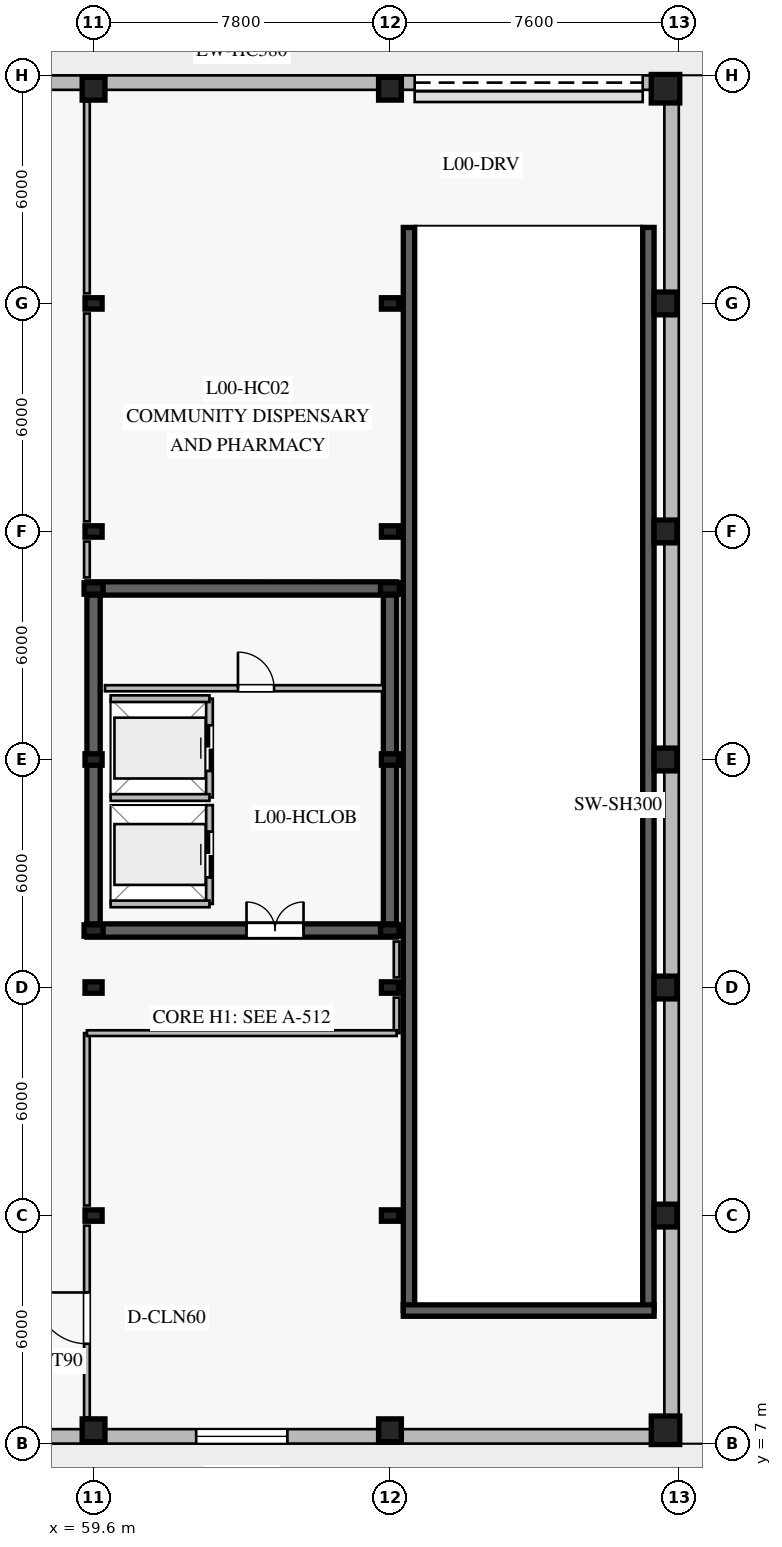
"""IFC4 building model, lengths in metres.
Left out: names, types, materials, properties, quantities, classifications, styles, units other than length and angle.
Written with IfcOpenShell. Run it as: python <this file> out.ifc"""

import sys

from ifc_helpers import new_model, si_unit, direction, frame, frame_2d, origin, origin_2d, place, context, subcontext, project, spatial, rectangle, i_section, extrude, element, fill, save


model = new_model("IFC4")
c1 = context("Model", 3, precision=1e-05, world=origin(), true_north=direction((0.0, 1.0)))
c2 = subcontext(c1, "Body", "Model", "MODEL_VIEW")
j1 = project(units=[si_unit("LENGTHUNIT", "METRE"), si_unit("PLANEANGLEUNIT", "RADIAN")], contexts=[c1])
p1 = place(None, origin())
s1 = spatial("IfcSite", under=j1, at=p1, CompositionType="ELEMENT")
p2 = place(p1, origin())
s2 = spatial("IfcBuilding", under=s1, at=p2, CompositionType="ELEMENT")
p3 = place(p2, origin())
s3 = spatial("IfcBuildingStorey", under=s2, at=p3, CompositionType="ELEMENT", Elevation=0.0)
for number, where, z_axis, x_axis in (
    (1, (67.9, 10.5, 0.0), (0.0, 0.0, 1.0), (0.0, 1.0, 0.0)),
    (2, (74.2, 10.5, 0.0), (0.0, 0.0, 1.0), (0.0, 1.0, 0.0)),
):
    element("IfcWall", number, at=place(p3, frame(where, z_axis=z_axis, x_axis=x_axis)), inside=s3, PredefinedType="SOLIDWALL", context=c2, shape_type="SweptSolid", body=[
        extrude(rectangle(XDim=28.5, YDim=0.3, at=frame_2d((14.25, 0.0))), origin(), (0.0, 0.0, 1.0), 4.94),
    ])
p4 = place(p3, frame((67.75, 10.5, 0.0), z_axis=(0.0, 0.0, 1.0), x_axis=(1.0, 0.0, 0.0)))
e3 = element("IfcWall", 3, at=p4, inside=s3, PredefinedType="SOLIDWALL", context=c2, shape_type="SweptSolid", body=[
    extrude(rectangle(XDim=6.6, YDim=0.3, at=frame_2d((3.3, 0.0))), origin(), (0.0, 0.0, 1.0), 4.94),
])
p5 = place(p3, frame((59.425, 20.5, 0.0), z_axis=(0.0, 0.0, 1.0), x_axis=(1.0, 0.0, 0.0)))
e4 = element("IfcWall", 4, at=p5, inside=s3, PredefinedType="SHEAR", context=c2, shape_type="SweptSolid", body=[
    extrude(rectangle(XDim=8.15, YDim=0.35, at=frame_2d((4.075, 0.0))), origin(), (0.0, 0.0, 1.0), 4.94),
])
p6 = place(p5, frame((4.2, 0.0, 0.0)))
e5 = element("IfcOpeningElement", 5, at=p6, cuts=e4, PredefinedType="OPENING", context=c2, shape_type="SweptSolid", body=[
    extrude(rectangle(XDim=1.5, YDim=2.2, at=frame_2d((0.75, 1.1))), frame((0.0, 0.185, 0.0), z_axis=(0.0, -1.0, 0.0), x_axis=(1.0, 0.0, 0.0)), (0.0, 0.0, 1.0), 0.37),
])
p7 = place(p3, frame((67.575, 29.5, 0.0), z_axis=(0.0, 0.0, 1.0), x_axis=(-1.0, 0.0, 0.0)))
e6 = element("IfcWall", 6, at=p7, inside=s3, PredefinedType="SHEAR", context=c2, shape_type="SweptSolid", body=[
    extrude(rectangle(XDim=8.15, YDim=0.35, at=frame_2d((4.075, 0.0))), origin(), (0.0, 0.0, 1.0), 4.94),
])
for number, where, z_axis, x_axis in (
    (7, (59.6, 29.325, 0.0), (0.0, 0.0, 1.0), (0.0, -1.0, 0.0)),
    (8, (67.4, 20.675, 0.0), (0.0, 0.0, 1.0), (0.0, 1.0, 0.0)),
):
    element("IfcWall", number, at=place(p3, frame(where, z_axis=z_axis, x_axis=x_axis)), inside=s3, PredefinedType="SHEAR", context=c2, shape_type="SweptSolid", body=[
        extrude(rectangle(XDim=8.65, YDim=0.35, at=frame_2d((4.325, 0.0))), origin(), (0.0, 0.0, 1.0), 4.94),
    ])
for number, where, z_axis, x_axis in (
    (9, (59.6, 20.5, 0.0), (0.0, 0.0, 1.0), (1.0, 0.0, 0.0)),
    (10, (67.4, 20.5, 0.0), (0.0, 0.0, 1.0), (1.0, 0.0, 0.0)),
    (11, (67.4, 29.5, 0.0), (0.0, 0.0, 1.0), (1.0, 0.0, 0.0)),
    (12, (59.6, 29.5, 0.0), (0.0, 0.0, 1.0), (1.0, 0.0, 0.0)),
):
    element("IfcColumn", number, at=place(p3, frame(where, z_axis=z_axis, x_axis=x_axis)), inside=s3, PredefinedType="COLUMN", context=c2, shape_type="SweptSolid", body=[
        extrude(i_section(OverallWidth=0.3, OverallDepth=0.5, WebThickness=0.014, FlangeThickness=0.028, at=origin_2d()), origin(), (0.0, 0.0, 1.0), 5.2),
    ])
p8 = place(p3, frame((59.6, 7.35, 0.0), z_axis=(0.0, 0.0, 1.0), x_axis=(1.0, 0.0, 0.0)))
e13 = element("IfcColumn", 13, at=p8, inside=s3, PredefinedType="COLUMN", context=c2, shape_type="SweptSolid", body=[
    extrude(rectangle(XDim=0.6, YDim=0.6, at=origin_2d()), origin(), (0.0, 0.0, 1.0), 5.2),
])
for number, where, z_axis, x_axis in (
    (14, (59.6, 13.0, 0.0), (0.0, 0.0, 1.0), (1.0, 0.0, 0.0)),
    (15, (59.6, 19.0, 0.0), (0.0, 0.0, 1.0), (1.0, 0.0, 0.0)),
    (16, (59.6, 25.0, 0.0), (0.0, 0.0, 1.0), (1.0, 0.0, 0.0)),
    (17, (59.6, 31.0, 0.0), (0.0, 0.0, 1.0), (1.0, 0.0, 0.0)),
    (18, (59.6, 37.0, 0.0), (0.0, 0.0, 1.0), (1.0, 0.0, 0.0)),
):
    element("IfcColumn", number, at=place(p3, frame(where, z_axis=z_axis, x_axis=x_axis)), inside=s3, PredefinedType="COLUMN", context=c2, shape_type="SweptSolid", body=[
        extrude(i_section(OverallWidth=0.3, OverallDepth=0.45, WebThickness=0.014, FlangeThickness=0.026, at=origin_2d()), origin(), (0.0, 0.0, 1.0), 5.2),
    ])
for number, where, z_axis, x_axis in (
    (19, (59.6, 42.65, 0.0), (0.0, 0.0, 1.0), (1.0, 0.0, 0.0)),
    (20, (67.4, 7.35, 0.0), (0.0, 0.0, 1.0), (1.0, 0.0, 0.0)),
):
    element("IfcColumn", number, at=place(p3, frame(where, z_axis=z_axis, x_axis=x_axis)), inside=s3, PredefinedType="COLUMN", context=c2, shape_type="SweptSolid", body=[
        extrude(rectangle(XDim=0.6, YDim=0.6, at=origin_2d()), origin(), (0.0, 0.0, 1.0), 5.2),
    ])
for number, where, z_axis, x_axis in (
    (21, (67.4, 13.0, 0.0), (0.0, 0.0, 1.0), (1.0, 0.0, 0.0)),
    (22, (67.4, 19.0, 0.0), (0.0, 0.0, 1.0), (1.0, 0.0, 0.0)),
    (23, (67.4, 25.0, 0.0), (0.0, 0.0, 1.0), (1.0, 0.0, 0.0)),
    (24, (67.4, 31.0, 0.0), (0.0, 0.0, 1.0), (1.0, 0.0, 0.0)),
    (25, (67.4, 37.0, 0.0), (0.0, 0.0, 1.0), (1.0, 0.0, 0.0)),
):
    element("IfcColumn", number, at=place(p3, frame(where, z_axis=z_axis, x_axis=x_axis)), inside=s3, PredefinedType="COLUMN", context=c2, shape_type="SweptSolid", body=[
        extrude(i_section(OverallWidth=0.3, OverallDepth=0.45, WebThickness=0.014, FlangeThickness=0.026, at=origin_2d()), origin(), (0.0, 0.0, 1.0), 5.2),
    ])
p9 = place(p3, frame((67.4, 42.65, 0.0), z_axis=(0.0, 0.0, 1.0), x_axis=(1.0, 0.0, 0.0)))
e26 = element("IfcColumn", 26, at=p9, inside=s3, PredefinedType="COLUMN", context=c2, shape_type="SweptSolid", body=[
    extrude(rectangle(XDim=0.6, YDim=0.6, at=origin_2d()), origin(), (0.0, 0.0, 1.0), 5.2),
])
p10 = place(p3, frame((74.65, 7.35, 0.0), z_axis=(0.0, 0.0, 1.0), x_axis=(1.0, 0.0, 0.0)))
e27 = element("IfcColumn", 27, at=p10, inside=s3, PredefinedType="COLUMN", context=c2, shape_type="SweptSolid", body=[
    extrude(rectangle(XDim=0.75, YDim=0.75, at=origin_2d()), origin(), (0.0, 0.0, 1.0), 5.2),
])
for number, where, z_axis, x_axis in (
    (28, (74.65, 13.0, 0.0), (0.0, 0.0, 1.0), (1.0, 0.0, 0.0)),
    (29, (74.65, 19.0, 0.0), (0.0, 0.0, 1.0), (1.0, 0.0, 0.0)),
    (30, (74.65, 25.0, 0.0), (0.0, 0.0, 1.0), (1.0, 0.0, 0.0)),
    (31, (74.65, 31.0, 0.0), (0.0, 0.0, 1.0), (1.0, 0.0, 0.0)),
    (32, (74.65, 37.0, 0.0), (0.0, 0.0, 1.0), (1.0, 0.0, 0.0)),
):
    element("IfcColumn", number, at=place(p3, frame(where, z_axis=z_axis, x_axis=x_axis)), inside=s3, PredefinedType="COLUMN", context=c2, shape_type="SweptSolid", body=[
        extrude(rectangle(XDim=0.6, YDim=0.6, at=origin_2d()), origin(), (0.0, 0.0, 1.0), 5.2),
    ])
p11 = place(p3, frame((74.65, 42.65, 0.0), z_axis=(0.0, 0.0, 1.0), x_axis=(1.0, 0.0, 0.0)))
e33 = element("IfcColumn", 33, at=p11, inside=s3, PredefinedType="COLUMN", context=c2, shape_type="SweptSolid", body=[
    extrude(rectangle(XDim=0.75, YDim=0.75, at=origin_2d()), origin(), (0.0, 0.0, 1.0), 5.2),
])
p12 = place(p3, frame((75.0, 7.19, 0.0), z_axis=(0.0, 0.0, 1.0), x_axis=(-1.0, 0.0, 0.0)))
e34 = element("IfcWall", 34, at=p12, inside=s3, PredefinedType="STANDARD", context=c2, shape_type="SweptSolid", body=[
    extrude(rectangle(XDim=23.0, YDim=0.38, at=frame_2d((11.5, 0.0))), origin(), (0.0, 0.0, 1.0), 4.94),
])
p13 = place(p12, frame((18.95, 0.0, 0.0)))
e35 = element("IfcOpeningElement", 35, at=p13, cuts=e34, PredefinedType="OPENING", context=c2, shape_type="SweptSolid", body=[
    extrude(rectangle(XDim=2.0, YDim=2.4, at=frame_2d((1.0, 1.2))), frame((0.0, 0.2, 0.0), z_axis=(0.0, -1.0, 0.0), x_axis=(1.0, 0.0, 0.0)), (0.0, 0.0, 1.0), 0.4),
])
p14 = place(p12, frame((10.3, 0.0, 0.95)))
e36 = element("IfcOpeningElement", 36, at=p14, cuts=e34, PredefinedType="OPENING", context=c2, shape_type="SweptSolid", body=[
    extrude(rectangle(XDim=2.4, YDim=1.8, at=frame_2d((1.2, 0.9))), frame((0.0, 0.2, 0.0), z_axis=(0.0, -1.0, 0.0), x_axis=(1.0, 0.0, 0.0)), (0.0, 0.0, 1.0), 0.4),
])
p15 = place(p3, frame((52.0, 42.81, 0.0), z_axis=(0.0, 0.0, 1.0), x_axis=(1.0, 0.0, 0.0)))
e37 = element("IfcWall", 37, at=p15, inside=s3, PredefinedType="STANDARD", context=c2, shape_type="SweptSolid", body=[
    extrude(rectangle(XDim=23.0, YDim=0.38, at=frame_2d((11.5, 0.0))), origin(), (0.0, 0.0, 1.0), 4.94),
])
p16 = place(p15, frame((2.05, 0.0, 0.0)))
e38 = element("IfcOpeningElement", 38, at=p16, cuts=e37, PredefinedType="OPENING", context=c2, shape_type="SweptSolid", body=[
    extrude(rectangle(XDim=2.0, YDim=2.4, at=frame_2d((1.0, 1.2))), frame((0.0, 0.2, 0.0), z_axis=(0.0, -1.0, 0.0), x_axis=(1.0, 0.0, 0.0)), (0.0, 0.0, 1.0), 0.4),
])
p17 = place(p15, frame((16.05, 0.0, 0.0)))
e39 = element("IfcOpeningElement", 39, at=p17, cuts=e37, PredefinedType="OPENING", context=c2, shape_type="SweptSolid", body=[
    extrude(rectangle(XDim=6.0, YDim=2.6, at=frame_2d((3.0, 1.3))), frame((0.0, 0.2, 0.0), z_axis=(0.0, -1.0, 0.0), x_axis=(1.0, 0.0, 0.0)), (0.0, 0.0, 1.0), 0.4),
])
p18 = place(p3, frame((74.81, 42.62, 0.0), z_axis=(0.0, 0.0, 1.0), x_axis=(0.0, -1.0, 0.0)))
e40 = element("IfcWall", 40, at=p18, inside=s3, PredefinedType="STANDARD", context=c2, shape_type="SweptSolid", body=[
    extrude(rectangle(XDim=35.24, YDim=0.38, at=frame_2d((17.62, 0.0))), origin(), (0.0, 0.0, 1.0), 4.94),
])
p19 = place(p3, frame((62.65, 21.2, 0.0), z_axis=(0.0, 0.0, 1.0), x_axis=(0.0, 1.0, 0.0)))
e41 = element("IfcWall", 41, at=p19, inside=s3, PredefinedType="PARTITIONING", context=c2, shape_type="SweptSolid", body=[
    extrude(rectangle(XDim=2.6, YDim=0.175, at=frame_2d((1.3, 0.0))), origin(), (0.0, 0.0, 1.0), 4.94),
])
p20 = place(p19, frame((0.7, 0.0, 0.0)))
e42 = element("IfcOpeningElement", 42, at=p20, cuts=e41, PredefinedType="OPENING", context=c2, shape_type="SweptSolid", body=[
    extrude(rectangle(XDim=1.2, YDim=2.2, at=frame_2d((0.6, 1.1))), frame((0.0, 0.098, 0.0), z_axis=(0.0, -1.0, 0.0), x_axis=(1.0, 0.0, 0.0)), (0.0, 0.0, 1.0), 0.195),
])
p21 = place(p3, frame((60.05, 21.2, 0.0), z_axis=(0.0, 0.0, 1.0), x_axis=(1.0, 0.0, 0.0)))
e43 = element("IfcWall", 43, at=p21, inside=s3, PredefinedType="PARTITIONING", context=c2, shape_type="SweptSolid", body=[
    extrude(rectangle(XDim=2.6, YDim=0.175, at=frame_2d((1.3, 0.0))), origin(), (0.0, 0.0, 1.0), 4.94),
])
p22 = place(p3, frame((62.65, 24.0, 0.0), z_axis=(0.0, 0.0, 1.0), x_axis=(0.0, 1.0, 0.0)))
e44 = element("IfcWall", 44, at=p22, inside=s3, PredefinedType="PARTITIONING", context=c2, shape_type="SweptSolid", body=[
    extrude(rectangle(XDim=2.6, YDim=0.175, at=frame_2d((1.3, 0.0))), origin(), (0.0, 0.0, 1.0), 4.58),
])
p23 = place(p22, frame((0.7, 0.0, 0.0)))
e45 = element("IfcOpeningElement", 45, at=p23, cuts=e44, PredefinedType="OPENING", context=c2, shape_type="SweptSolid", body=[
    extrude(rectangle(XDim=1.2, YDim=2.2, at=frame_2d((0.6, 1.1))), frame((0.0, 0.098, 0.0), z_axis=(0.0, -1.0, 0.0), x_axis=(1.0, 0.0, 0.0)), (0.0, 0.0, 1.0), 0.195),
])
for number, where, z_axis, x_axis in (
    (46, (60.05, 24.0, 0.0), (0.0, 0.0, 1.0), (1.0, 0.0, 0.0)),
    (47, (60.05, 26.6, 0.0), (0.0, 0.0, 1.0), (1.0, 0.0, 0.0)),
):
    element("IfcWall", number, at=place(p3, frame(where, z_axis=z_axis, x_axis=x_axis)), inside=s3, PredefinedType="PARTITIONING", context=c2, shape_type="SweptSolid", body=[
        extrude(rectangle(XDim=2.6, YDim=0.175, at=frame_2d((1.3, 0.0))), origin(), (0.0, 0.0, 1.0), 4.94),
    ])
p24 = place(p3, frame((59.9, 26.875, 0.0), z_axis=(0.0, 0.0, 1.0), x_axis=(1.0, 0.0, 0.0)))
e48 = element("IfcWall", 48, at=p24, inside=s3, PredefinedType="PLUMBINGWALL", context=c2, shape_type="SweptSolid", body=[
    extrude(rectangle(XDim=7.325, YDim=0.16, at=frame_2d((3.663, 0.0))), origin(), (0.0, 0.0, 1.0), 4.58),
])
p25 = place(p24, frame((3.5, 0.0, 0.0)))
e49 = element("IfcOpeningElement", 49, at=p25, cuts=e48, PredefinedType="OPENING", context=c2, shape_type="SweptSolid", body=[
    extrude(rectangle(XDim=0.95, YDim=2.1, at=frame_2d((0.475, 1.05))), frame((0.0, 0.09, 0.0), z_axis=(0.0, -1.0, 0.0), x_axis=(1.0, 0.0, 0.0)), (0.0, 0.0, 1.0), 0.18),
])
p26 = place(p3, frame((59.425, 7.69, 0.0), z_axis=(0.0, 0.0, 1.0), x_axis=(0.0, 1.0, 0.0)))
e50 = element("IfcWall", 50, at=p26, inside=s3, PredefinedType="PARTITIONING", context=c2, shape_type="SweptSolid", body=[
    extrude(rectangle(XDim=5.045, YDim=0.15, at=frame_2d((2.522, 0.0))), origin(), (0.0, 0.0, 1.0), 4.58),
])
p27 = place(p26, frame((1.936, 0.0, 0.0)))
e51 = element("IfcOpeningElement", 51, at=p27, cuts=e50, PredefinedType="OPENING", context=c2, shape_type="SweptSolid", body=[
    extrude(rectangle(XDim=1.35, YDim=2.2, at=frame_2d((0.675, 1.1))), frame((0.0, 0.085, 0.0), z_axis=(0.0, -1.0, 0.0), x_axis=(1.0, 0.0, 0.0)), (0.0, 0.0, 1.0), 0.17),
])
p28 = place(p3, frame((59.425, 13.265, 0.0), z_axis=(0.0, 0.0, 1.0), x_axis=(0.0, 1.0, 0.0)))
e52 = element("IfcWall", 52, at=p28, inside=s3, PredefinedType="PARTITIONING", context=c2, shape_type="SweptSolid", body=[
    extrude(rectangle(XDim=4.535, YDim=0.15, at=frame_2d((2.268, 0.0))), origin(), (0.0, 0.0, 1.0), 4.58),
])
p29 = place(p3, frame((59.425, 29.79, 0.0), z_axis=(0.0, 0.0, 1.0), x_axis=(0.0, 1.0, 0.0)))
e53 = element("IfcWall", 53, at=p29, inside=s3, PredefinedType="PARTITIONING", context=c2, shape_type="SweptSolid", body=[
    extrude(rectangle(XDim=0.945, YDim=0.15, at=frame_2d((0.473, 0.0))), origin(), (0.0, 0.0, 1.0), 4.58),
])
p30 = place(p3, frame((59.425, 31.265, 0.0), z_axis=(0.0, 0.0, 1.0), x_axis=(0.0, 1.0, 0.0)))
e54 = element("IfcWall", 54, at=p30, inside=s3, PredefinedType="PARTITIONING", context=c2, shape_type="SweptSolid", body=[
    extrude(rectangle(XDim=5.47, YDim=0.15, at=frame_2d((2.735, 0.0))), origin(), (0.0, 0.0, 1.0), 4.58),
])
p31 = place(p3, frame((59.425, 37.265, 0.0), z_axis=(0.0, 0.0, 1.0), x_axis=(0.0, 1.0, 0.0)))
e55 = element("IfcWall", 55, at=p31, inside=s3, PredefinedType="PARTITIONING", context=c2, shape_type="SweptSolid", body=[
    extrude(rectangle(XDim=5.045, YDim=0.15, at=frame_2d((2.522, 0.0))), origin(), (0.0, 0.0, 1.0), 4.58),
])
p32 = place(p3, frame((67.575, 17.8, 0.0), z_axis=(0.0, 0.0, 1.0), x_axis=(0.0, 1.0, 0.0)))
e56 = element("IfcWall", 56, at=p32, inside=s3, PredefinedType="PARTITIONING", context=c2, shape_type="SweptSolid", body=[
    extrude(rectangle(XDim=0.935, YDim=0.15, at=frame_2d((0.468, 0.0))), origin(), (0.0, 0.0, 1.0), 4.58),
])
p33 = place(p3, frame((67.575, 19.265, 0.0), z_axis=(0.0, 0.0, 1.0), x_axis=(0.0, 1.0, 0.0)))
e57 = element("IfcWall", 57, at=p33, inside=s3, PredefinedType="PARTITIONING", context=c2, shape_type="SweptSolid", body=[
    extrude(rectangle(XDim=0.945, YDim=0.15, at=frame_2d((0.473, 0.0))), origin(), (0.0, 0.0, 1.0), 4.58),
])
p34 = place(p3, frame((59.425, 17.8, 0.0), z_axis=(0.0, 0.0, 1.0), x_axis=(1.0, 0.0, 0.0)))
e58 = element("IfcWall", 58, at=p34, inside=s3, PredefinedType="PARTITIONING", context=c2, shape_type="SweptSolid", body=[
    extrude(rectangle(XDim=8.15, YDim=0.15, at=frame_2d((4.075, 0.0))), origin(), (0.0, 0.0, 1.0), 4.58),
])
p35 = place(p17, origin())
e59 = element("IfcDoor", 59, at=p35, inside=s3, OperationType="ROLLINGUP", PredefinedType="GATE", context=c2, shape_type="SweptSolid", body=[
    extrude(rectangle(XDim=6.0, YDim=2.6, at=frame_2d((3.0, 1.3))), frame((0.0, 0.025, 0.0), z_axis=(0.0, -1.0, 0.0), x_axis=(1.0, 0.0, 0.0)), (0.0, 0.0, 1.0), 0.05),
])
fill(e39, e59)
p36 = place(p14, origin())
e60 = element("IfcWindow", 60, at=p36, inside=s3, PartitioningType="TRIPLE_PANEL_VERTICAL", PredefinedType="WINDOW", context=c2, shape_type="SweptSolid", body=[
    extrude(rectangle(XDim=2.4, YDim=1.8, at=frame_2d((1.2, 0.9))), frame((0.0, 0.03, 0.0), z_axis=(0.0, -1.0, 0.0), x_axis=(1.0, 0.0, 0.0)), (0.0, 0.0, 1.0), 0.06),
])
fill(e36, e60)
p37 = place(p20, origin())
e61 = element("IfcDoor", 61, at=p37, inside=s3, OperationType="DOUBLE_DOOR_SLIDING", PredefinedType="DOOR", context=c2, shape_type="SweptSolid", body=[
    extrude(rectangle(XDim=1.2, YDim=2.2, at=frame_2d((0.6, 1.1))), frame((0.0, 0.025, 0.0), z_axis=(0.0, -1.0, 0.0), x_axis=(1.0, 0.0, 0.0)), (0.0, 0.0, 1.0), 0.05),
])
fill(e42, e61)
p38 = place(p23, origin())
e62 = element("IfcDoor", 62, at=p38, inside=s3, OperationType="DOUBLE_DOOR_SLIDING", PredefinedType="DOOR", context=c2, shape_type="SweptSolid", body=[
    extrude(rectangle(XDim=1.2, YDim=2.2, at=frame_2d((0.6, 1.1))), frame((0.0, 0.025, 0.0), z_axis=(0.0, -1.0, 0.0), x_axis=(1.0, 0.0, 0.0)), (0.0, 0.0, 1.0), 0.05),
])
fill(e45, e62)
p39 = place(p6, origin())
e63 = element("IfcDoor", 63, at=p39, inside=s3, OperationType="DOUBLE_DOOR_SINGLE_SWING", PredefinedType="DOOR", context=c2, shape_type="SweptSolid", body=[
    extrude(rectangle(XDim=1.5, YDim=2.2, at=frame_2d((0.75, 1.1))), frame((0.0, 0.025, 0.0), z_axis=(0.0, -1.0, 0.0), x_axis=(1.0, 0.0, 0.0)), (0.0, 0.0, 1.0), 0.05),
])
fill(e5, e63)
p40 = place(p25, origin())
e64 = element("IfcDoor", 64, at=p40, inside=s3, OperationType="SINGLE_SWING_LEFT", PredefinedType="DOOR", context=c2, shape_type="SweptSolid", body=[
    extrude(rectangle(XDim=0.95, YDim=2.1, at=frame_2d((0.475, 1.05))), frame((0.0, 0.025, 0.0), z_axis=(0.0, -1.0, 0.0), x_axis=(1.0, 0.0, 0.0)), (0.0, 0.0, 1.0), 0.05),
])
fill(e49, e64)
p41 = place(p27, origin())
e65 = element("IfcDoor", 65, at=p41, inside=s3, OperationType="SINGLE_SWING_RIGHT", PredefinedType="DOOR", context=c2, shape_type="SweptSolid", body=[
    extrude(rectangle(XDim=1.35, YDim=2.2, at=frame_2d((0.675, 1.1))), frame((0.0, 0.025, 0.0), z_axis=(0.0, -1.0, 0.0), x_axis=(1.0, 0.0, 0.0)), (0.0, 0.0, 1.0), 0.05),
])
fill(e51, e65)
save(model, sys.argv[1])
